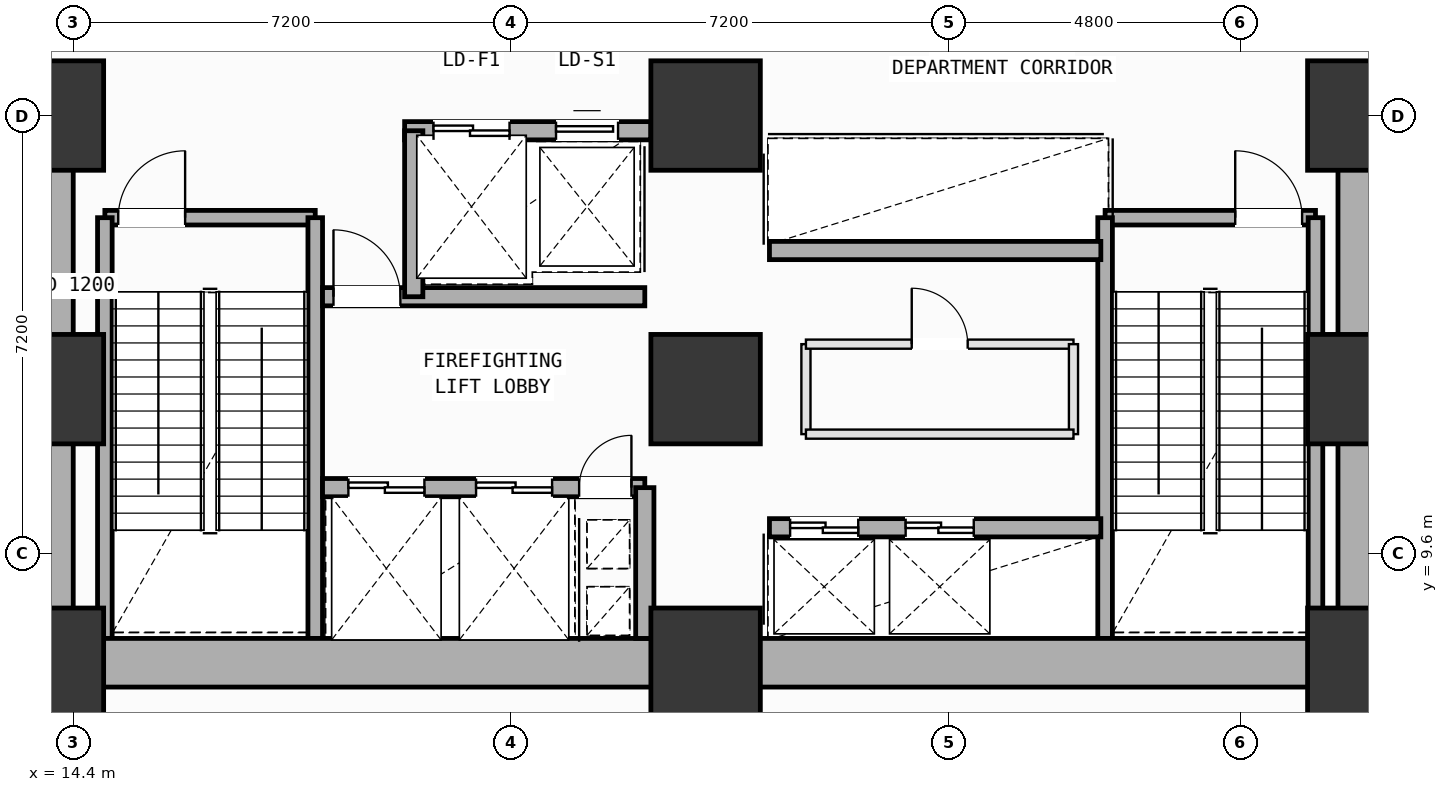
"""IFC4 building model, lengths in metres.
Left out: names, types, materials, properties, quantities, classifications, styles, units other than length and angle.
Written with IfcOpenShell. Run it as: python <this file> out.ifc"""

import sys

from ifc_helpers import new_model, si_unit, direction, frame, frame_2d, origin, origin_2d, place, context, subcontext, project, spatial, rectangle, extrude, element, fill, save


model = new_model("IFC4")
c1 = context("Model", 3, precision=1e-05, world=origin(), true_north=direction((0.0, 1.0)))
c2 = subcontext(c1, "Body", "Model", "MODEL_VIEW")
j1 = project(units=[si_unit("LENGTHUNIT", "METRE"), si_unit("PLANEANGLEUNIT", "RADIAN")], contexts=[c1])
p1 = place(None, origin())
s1 = spatial("IfcSite", under=j1, at=p1, CompositionType="ELEMENT")
p2 = place(p1, origin())
s2 = spatial("IfcBuilding", under=s1, at=p2, CompositionType="ELEMENT")
p3 = place(p2, frame((0.0, 0.0, 5.4)))
s3 = spatial("IfcBuildingStorey", under=s2, at=p3, CompositionType="ELEMENT", Elevation=5.4)
for number, where, z_axis, x_axis in (
    (1, (14.0, 7.8, 0.0), (0.0, 0.0, 1.0), (1.0, 0.0, 0.0)),
    (2, (14.0, 12.3, 0.0), (0.0, 0.0, 1.0), (1.0, 0.0, 0.0)),
    (3, (14.0, 16.8, 0.0), (0.0, 0.0, 1.0), (1.0, 0.0, 0.0)),
    (4, (24.8, 7.8, 0.0), (0.0, 0.0, 1.0), (1.0, 0.0, 0.0)),
    (5, (24.8, 12.3, 0.0), (0.0, 0.0, 1.0), (1.0, 0.0, 0.0)),
    (6, (24.8, 16.8, 0.0), (0.0, 0.0, 1.0), (1.0, 0.0, 0.0)),
    (7, (35.6, 7.8, 0.0), (0.0, 0.0, 1.0), (1.0, 0.0, 0.0)),
    (8, (35.6, 12.3, 0.0), (0.0, 0.0, 1.0), (1.0, 0.0, 0.0)),
    (9, (35.6, 16.8, 0.0), (0.0, 0.0, 1.0), (1.0, 0.0, 0.0)),
):
    element("IfcColumn", number, at=place(p3, frame(where, z_axis=z_axis, x_axis=x_axis)), inside=s3, PredefinedType="COLUMN", context=c2, shape_type="SweptSolid", body=[
        extrude(rectangle(XDim=1.8, YDim=1.8, at=origin_2d()), origin(), (0.0, 0.0, 1.0), 5.4),
    ])
p4 = place(p3, frame((14.92, 15.12, 0.0), z_axis=(0.0, 0.0, 1.0), x_axis=(1.0, 0.0, 0.0)))
e10 = element("IfcWall", 10, at=p4, inside=s3, PredefinedType="SOLIDWALL", context=c2, shape_type="SweptSolid", body=[
    extrude(rectangle(XDim=3.46, YDim=0.24, at=frame_2d((1.73, 0.0))), origin(), (0.0, 0.0, 1.0), 5.15),
])
p5 = place(p4, frame((0.22, 0.0, 0.0)))
e11 = element("IfcOpeningElement", 11, at=p5, cuts=e10, PredefinedType="OPENING", context=c2, shape_type="SweptSolid", body=[
    extrude(rectangle(XDim=1.1, YDim=2.15, at=frame_2d((0.55, 1.075))), frame((0.0, 0.13, 0.0), z_axis=(0.0, -1.0, 0.0), x_axis=(1.0, 0.0, 0.0)), (0.0, 0.0, 1.0), 0.26),
])
for number, where, z_axis, x_axis in (
    (12, (18.38, 15.12, 0.0), (0.0, 0.0, 1.0), (0.0, -1.0, 0.0)),
    (13, (14.92, 8.2, 0.0), (0.0, 0.0, 1.0), (0.0, 1.0, 0.0)),
):
    element("IfcWall", number, at=place(p3, frame(where, z_axis=z_axis, x_axis=x_axis)), inside=s3, PredefinedType="SOLIDWALL", context=c2, shape_type="SweptSolid", body=[
        extrude(rectangle(XDim=6.92, YDim=0.24, at=frame_2d((3.46, 0.0))), origin(), (0.0, 0.0, 1.0), 5.15),
    ])
p6 = place(p3, frame((31.37, 15.12, 0.0), z_axis=(0.0, 0.0, 1.0), x_axis=(1.0, 0.0, 0.0)))
e14 = element("IfcWall", 14, at=p6, inside=s3, PredefinedType="SOLIDWALL", context=c2, shape_type="SweptSolid", body=[
    extrude(rectangle(XDim=3.46, YDim=0.24, at=frame_2d((1.73, 0.0))), origin(), (0.0, 0.0, 1.0), 5.15),
])
p7 = place(p6, frame((2.14, 0.0, 0.0)))
e15 = element("IfcOpeningElement", 15, at=p7, cuts=e14, PredefinedType="OPENING", context=c2, shape_type="SweptSolid", body=[
    extrude(rectangle(XDim=1.1, YDim=2.15, at=frame_2d((0.55, 1.075))), frame((0.0, 0.13, 0.0), z_axis=(0.0, -1.0, 0.0), x_axis=(1.0, 0.0, 0.0)), (0.0, 0.0, 1.0), 0.26),
])
for number, where, z_axis, x_axis in (
    (16, (34.83, 15.12, 0.0), (0.0, 0.0, 1.0), (0.0, -1.0, 0.0)),
    (17, (31.37, 8.2, 0.0), (0.0, 0.0, 1.0), (0.0, 1.0, 0.0)),
):
    element("IfcWall", number, at=place(p3, frame(where, z_axis=z_axis, x_axis=x_axis)), inside=s3, PredefinedType="SOLIDWALL", context=c2, shape_type="SweptSolid", body=[
        extrude(rectangle(XDim=6.92, YDim=0.24, at=frame_2d((3.46, 0.0))), origin(), (0.0, 0.0, 1.0), 5.15),
    ])
for number, where, z_axis, x_axis in (
    (18, (14.0, 7.8, 0.0), (0.0, 0.0, 1.0), (1.0, 0.0, 0.0)),
    (19, (24.8, 7.8, 0.0), (0.0, 0.0, 1.0), (1.0, 0.0, 0.0)),
):
    element("IfcWall", number, at=place(p3, frame(where, z_axis=z_axis, x_axis=x_axis)), inside=s3, PredefinedType="SHEAR", context=c2, shape_type="SweptSolid", body=[
        extrude(rectangle(XDim=10.8, YDim=0.8, at=frame_2d((5.4, 0.0))), origin(), (0.0, 0.0, 1.0), 5.15),
    ])
for number, where, z_axis, x_axis in (
    (20, (35.6, 7.8, 0.0), (0.0, 0.0, 1.0), (0.0, 1.0, 0.0)),
    (21, (14.0, 16.8, 0.0), (0.0, 0.0, 1.0), (0.0, -1.0, 0.0)),
):
    element("IfcWall", number, at=place(p3, frame(where, z_axis=z_axis, x_axis=x_axis)), inside=s3, PredefinedType="SHEAR", context=c2, shape_type="SweptSolid", body=[
        extrude(rectangle(XDim=9.0, YDim=0.8, at=frame_2d((4.5, 0.0))), origin(), (0.0, 0.0, 1.0), 5.15),
    ])
p8 = place(p3, frame((19.85, 16.55, 0.0), z_axis=(0.0, 0.0, 1.0), x_axis=(1.0, 0.0, 0.0)))
e22 = element("IfcWall", 22, at=p8, inside=s3, PredefinedType="SOLIDWALL", context=c2, shape_type="SweptSolid", body=[
    extrude(rectangle(XDim=4.05, YDim=0.3, at=frame_2d((2.025, 0.0))), origin(), (0.0, 0.0, 1.0), 5.15),
])
p9 = place(p8, frame((0.475, 0.0, 0.0)))
e23 = element("IfcOpeningElement", 23, at=p9, cuts=e22, PredefinedType="OPENING", context=c2, shape_type="SweptSolid", body=[
    extrude(rectangle(XDim=1.25, YDim=2.18, at=frame_2d((0.625, 1.09))), frame((0.0, 0.16, 0.0), z_axis=(0.0, -1.0, 0.0), x_axis=(1.0, 0.0, 0.0)), (0.0, 0.0, 1.0), 0.32),
])
p10 = place(p8, frame((2.49, 0.0, 0.0)))
e24 = element("IfcOpeningElement", 24, at=p10, cuts=e22, PredefinedType="OPENING", context=c2, shape_type="SweptSolid", body=[
    extrude(rectangle(XDim=1.02, YDim=2.12, at=frame_2d((0.51, 1.06))), frame((0.0, 0.16, 0.0), z_axis=(0.0, -1.0, 0.0), x_axis=(1.0, 0.0, 0.0)), (0.0, 0.0, 1.0), 0.32),
])
p11 = place(p3, frame((18.5, 10.68, 0.0), z_axis=(0.0, 0.0, 1.0), x_axis=(1.0, 0.0, 0.0)))
e25 = element("IfcWall", 25, at=p11, inside=s3, PredefinedType="SOLIDWALL", context=c2, shape_type="SweptSolid", body=[
    extrude(rectangle(XDim=5.3, YDim=0.3, at=frame_2d((2.65, 0.0))), origin(), (0.0, 0.0, 1.0), 5.15),
])
p12 = place(p11, frame((4.22, 0.0, 0.0)))
e26 = element("IfcOpeningElement", 26, at=p12, cuts=e25, PredefinedType="OPENING", context=c2, shape_type="SweptSolid", body=[
    extrude(rectangle(XDim=0.86, YDim=2.06, at=frame_2d((0.43, 1.03))), frame((0.0, 0.16, 0.0), z_axis=(0.0, -1.0, 0.0), x_axis=(1.0, 0.0, 0.0)), (0.0, 0.0, 1.0), 0.32),
])
p13 = place(p11, frame((0.425, 0.0, 0.0)))
e27 = element("IfcOpeningElement", 27, at=p13, cuts=e25, PredefinedType="OPENING", context=c2, shape_type="SweptSolid", body=[
    extrude(rectangle(XDim=1.25, YDim=2.18, at=frame_2d((0.625, 1.09))), frame((0.0, 0.16, 0.0), z_axis=(0.0, -1.0, 0.0), x_axis=(1.0, 0.0, 0.0)), (0.0, 0.0, 1.0), 0.32),
])
p14 = place(p11, frame((2.525, 0.0, 0.0)))
e28 = element("IfcOpeningElement", 28, at=p14, cuts=e25, PredefinedType="OPENING", context=c2, shape_type="SweptSolid", body=[
    extrude(rectangle(XDim=1.25, YDim=2.18, at=frame_2d((0.625, 1.09))), frame((0.0, 0.16, 0.0), z_axis=(0.0, -1.0, 0.0), x_axis=(1.0, 0.0, 0.0)), (0.0, 0.0, 1.0), 0.32),
])
p15 = place(p3, frame((18.5, 13.82, 0.0), z_axis=(0.0, 0.0, 1.0), x_axis=(1.0, 0.0, 0.0)))
e29 = element("IfcWall", 29, at=p15, inside=s3, PredefinedType="SOLIDWALL", context=c2, shape_type="SweptSolid", body=[
    extrude(rectangle(XDim=5.3, YDim=0.3, at=frame_2d((2.65, 0.0))), origin(), (0.0, 0.0, 1.0), 5.15),
])
p16 = place(p15, frame((0.18, 0.0, 0.0)))
e30 = element("IfcOpeningElement", 30, at=p16, cuts=e29, PredefinedType="OPENING", context=c2, shape_type="SweptSolid", body=[
    extrude(rectangle(XDim=1.1, YDim=2.15, at=frame_2d((0.55, 1.075))), frame((0.0, 0.16, 0.0), z_axis=(0.0, -1.0, 0.0), x_axis=(1.0, 0.0, 0.0)), (0.0, 0.0, 1.0), 0.32),
])
p17 = place(p3, frame((23.8, 8.2, 0.0), z_axis=(0.0, 0.0, 1.0), x_axis=(0.0, 1.0, 0.0)))
e31 = element("IfcWall", 31, at=p17, inside=s3, PredefinedType="SOLIDWALL", context=c2, shape_type="SweptSolid", body=[
    extrude(rectangle(XDim=2.48, YDim=0.3, at=frame_2d((1.24, 0.0))), origin(), (0.0, 0.0, 1.0), 5.15),
])
p18 = place(p3, frame((20.0, 13.82, 0.0), z_axis=(0.0, 0.0, 1.0), x_axis=(0.0, 1.0, 0.0)))
e32 = element("IfcWall", 32, at=p18, inside=s3, PredefinedType="SOLIDWALL", context=c2, shape_type="SweptSolid", body=[
    extrude(rectangle(XDim=2.73, YDim=0.3, at=frame_2d((1.365, 0.0))), origin(), (0.0, 0.0, 1.0), 5.15),
])
p19 = place(p3, frame((25.85, 10.02, 0.0), z_axis=(0.0, 0.0, 1.0), x_axis=(1.0, 0.0, 0.0)))
e33 = element("IfcWall", 33, at=p19, inside=s3, PredefinedType="SOLIDWALL", context=c2, shape_type="SweptSolid", body=[
    extrude(rectangle(XDim=5.45, YDim=0.3, at=frame_2d((2.725, 0.0))), origin(), (0.0, 0.0, 1.0), 5.15),
])
p20 = place(p19, frame((0.34, 0.0, 0.0)))
e34 = element("IfcOpeningElement", 34, at=p20, cuts=e33, PredefinedType="OPENING", context=c2, shape_type="SweptSolid", body=[
    extrude(rectangle(XDim=1.12, YDim=2.15, at=frame_2d((0.56, 1.075))), frame((0.0, 0.16, 0.0), z_axis=(0.0, -1.0, 0.0), x_axis=(1.0, 0.0, 0.0)), (0.0, 0.0, 1.0), 0.32),
])
p21 = place(p19, frame((2.24, 0.0, 0.0)))
e35 = element("IfcOpeningElement", 35, at=p21, cuts=e33, PredefinedType="OPENING", context=c2, shape_type="SweptSolid", body=[
    extrude(rectangle(XDim=1.12, YDim=2.15, at=frame_2d((0.56, 1.075))), frame((0.0, 0.16, 0.0), z_axis=(0.0, -1.0, 0.0), x_axis=(1.0, 0.0, 0.0)), (0.0, 0.0, 1.0), 0.32),
])
p22 = place(p3, frame((25.85, 14.58, 0.0), z_axis=(0.0, 0.0, 1.0), x_axis=(1.0, 0.0, 0.0)))
e36 = element("IfcWall", 36, at=p22, inside=s3, PredefinedType="SOLIDWALL", context=c2, shape_type="SweptSolid", body=[
    extrude(rectangle(XDim=5.45, YDim=0.3, at=frame_2d((2.725, 0.0))), origin(), (0.0, 0.0, 1.0), 5.15),
])
p23 = place(p3, frame((26.45, 11.56, 0.0), z_axis=(0.0, 0.0, 1.0), x_axis=(0.0, 1.0, 0.0)))
e37 = element("IfcWall", 37, at=p23, inside=s3, PredefinedType="PARTITIONING", context=c2, shape_type="SweptSolid", body=[
    extrude(rectangle(XDim=1.48, YDim=0.15, at=frame_2d((0.74, 0.0))), origin(), (0.0, 0.0, 1.0), 5.15),
])
p24 = place(p3, frame((26.45, 13.04, 0.0), z_axis=(0.0, 0.0, 1.0), x_axis=(1.0, 0.0, 0.0)))
e38 = element("IfcWall", 38, at=p24, inside=s3, PredefinedType="PARTITIONING", context=c2, shape_type="SweptSolid", body=[
    extrude(rectangle(XDim=4.4, YDim=0.15, at=frame_2d((2.2, 0.0))), origin(), (0.0, 0.0, 1.0), 5.15),
])
p25 = place(p24, frame((1.74, 0.0, 0.0)))
e39 = element("IfcOpeningElement", 39, at=p25, cuts=e38, PredefinedType="OPENING", context=c2, shape_type="SweptSolid", body=[
    extrude(rectangle(XDim=0.92, YDim=2.1, at=frame_2d((0.46, 1.05))), frame((0.0, 0.085, 0.0), z_axis=(0.0, -1.0, 0.0), x_axis=(1.0, 0.0, 0.0)), (0.0, 0.0, 1.0), 0.17),
])
p26 = place(p3, frame((30.85, 13.04, 0.0), z_axis=(0.0, 0.0, 1.0), x_axis=(0.0, -1.0, 0.0)))
e40 = element("IfcWall", 40, at=p26, inside=s3, PredefinedType="PARTITIONING", context=c2, shape_type="SweptSolid", body=[
    extrude(rectangle(XDim=1.48, YDim=0.15, at=frame_2d((0.74, 0.0))), origin(), (0.0, 0.0, 1.0), 5.15),
])
p27 = place(p3, frame((30.85, 11.56, 0.0), z_axis=(0.0, 0.0, 1.0), x_axis=(-1.0, 0.0, 0.0)))
e41 = element("IfcWall", 41, at=p27, inside=s3, PredefinedType="PARTITIONING", context=c2, shape_type="SweptSolid", body=[
    extrude(rectangle(XDim=4.4, YDim=0.15, at=frame_2d((2.2, 0.0))), origin(), (0.0, 0.0, 1.0), 5.15),
])
p28 = place(p5, origin())
e42 = element("IfcDoor", 42, at=p28, inside=s3, OperationType="SINGLE_SWING_RIGHT", PredefinedType="DOOR", context=c2, shape_type="SweptSolid", body=[
    extrude(rectangle(XDim=1.1, YDim=2.15, at=frame_2d((0.55, 1.075))), frame((0.0, 0.025, 0.0), z_axis=(0.0, -1.0, 0.0), x_axis=(1.0, 0.0, 0.0)), (0.0, 0.0, 1.0), 0.05),
])
fill(e11, e42)
p29 = place(p7, origin())
e43 = element("IfcDoor", 43, at=p29, inside=s3, OperationType="SINGLE_SWING_LEFT", PredefinedType="DOOR", context=c2, shape_type="SweptSolid", body=[
    extrude(rectangle(XDim=1.1, YDim=2.15, at=frame_2d((0.55, 1.075))), frame((0.0, 0.025, 0.0), z_axis=(0.0, -1.0, 0.0), x_axis=(1.0, 0.0, 0.0)), (0.0, 0.0, 1.0), 0.05),
])
fill(e15, e43)
p30 = place(p12, origin())
e44 = element("IfcDoor", 44, at=p30, inside=s3, OperationType="SINGLE_SWING_RIGHT", PredefinedType="DOOR", context=c2, shape_type="SweptSolid", body=[
    extrude(rectangle(XDim=0.86, YDim=2.06, at=frame_2d((0.43, 1.03))), frame((0.0, 0.025, 0.0), z_axis=(0.0, -1.0, 0.0), x_axis=(1.0, 0.0, 0.0)), (0.0, 0.0, 1.0), 0.05),
])
fill(e26, e44)
p31 = place(p16, origin())
e45 = element("IfcDoor", 45, at=p31, inside=s3, OperationType="SINGLE_SWING_LEFT", PredefinedType="DOOR", context=c2, shape_type="SweptSolid", body=[
    extrude(rectangle(XDim=1.1, YDim=2.15, at=frame_2d((0.55, 1.075))), frame((0.0, 0.025, 0.0), z_axis=(0.0, -1.0, 0.0), x_axis=(1.0, 0.0, 0.0)), (0.0, 0.0, 1.0), 0.05),
])
fill(e30, e45)
p32 = place(p13, origin())
e46 = element("IfcDoor", 46, at=p32, inside=s3, OperationType="DOUBLE_DOOR_SLIDING", PredefinedType="DOOR", context=c2, shape_type="SweptSolid", body=[
    extrude(rectangle(XDim=1.25, YDim=2.18, at=frame_2d((0.625, 1.09))), frame((0.0, 0.025, 0.0), z_axis=(0.0, -1.0, 0.0), x_axis=(1.0, 0.0, 0.0)), (0.0, 0.0, 1.0), 0.05),
])
fill(e27, e46)
p33 = place(p14, origin())
e47 = element("IfcDoor", 47, at=p33, inside=s3, OperationType="DOUBLE_DOOR_SLIDING", PredefinedType="DOOR", context=c2, shape_type="SweptSolid", body=[
    extrude(rectangle(XDim=1.25, YDim=2.18, at=frame_2d((0.625, 1.09))), frame((0.0, 0.025, 0.0), z_axis=(0.0, -1.0, 0.0), x_axis=(1.0, 0.0, 0.0)), (0.0, 0.0, 1.0), 0.05),
])
fill(e28, e47)
p34 = place(p20, origin())
e48 = element("IfcDoor", 48, at=p34, inside=s3, OperationType="DOUBLE_DOOR_SLIDING", PredefinedType="DOOR", context=c2, shape_type="SweptSolid", body=[
    extrude(rectangle(XDim=1.12, YDim=2.15, at=frame_2d((0.56, 1.075))), frame((0.0, 0.025, 0.0), z_axis=(0.0, -1.0, 0.0), x_axis=(1.0, 0.0, 0.0)), (0.0, 0.0, 1.0), 0.05),
])
fill(e34, e48)
p35 = place(p21, origin())
e49 = element("IfcDoor", 49, at=p35, inside=s3, OperationType="DOUBLE_DOOR_SLIDING", PredefinedType="DOOR", context=c2, shape_type="SweptSolid", body=[
    extrude(rectangle(XDim=1.12, YDim=2.15, at=frame_2d((0.56, 1.075))), frame((0.0, 0.025, 0.0), z_axis=(0.0, -1.0, 0.0), x_axis=(1.0, 0.0, 0.0)), (0.0, 0.0, 1.0), 0.05),
])
fill(e35, e49)
p36 = place(p9, origin())
e50 = element("IfcDoor", 50, at=p36, inside=s3, OperationType="DOUBLE_DOOR_SLIDING", PredefinedType="DOOR", context=c2, shape_type="SweptSolid", body=[
    extrude(rectangle(XDim=1.25, YDim=2.18, at=frame_2d((0.625, 1.09))), frame((0.0, 0.025, 0.0), z_axis=(0.0, -1.0, 0.0), x_axis=(1.0, 0.0, 0.0)), (0.0, 0.0, 1.0), 0.05),
])
fill(e23, e50)
p37 = place(p10, origin())
e51 = element("IfcDoor", 51, at=p37, inside=s3, OperationType="SLIDING_TO_LEFT", PredefinedType="DOOR", context=c2, shape_type="SweptSolid", body=[
    extrude(rectangle(XDim=1.02, YDim=2.12, at=frame_2d((0.51, 1.06))), frame((0.0, 0.025, 0.0), z_axis=(0.0, -1.0, 0.0), x_axis=(1.0, 0.0, 0.0)), (0.0, 0.0, 1.0), 0.05),
])
fill(e24, e51)
p38 = place(p25, origin())
e52 = element("IfcDoor", 52, at=p38, inside=s3, OperationType="SINGLE_SWING_LEFT", PredefinedType="DOOR", context=c2, shape_type="SweptSolid", body=[
    extrude(rectangle(XDim=0.92, YDim=2.1, at=frame_2d((0.46, 1.05))), frame((0.0, 0.025, 0.0), z_axis=(0.0, -1.0, 0.0), x_axis=(1.0, 0.0, 0.0)), (0.0, 0.0, 1.0), 0.05),
])
fill(e39, e52)
save(model, sys.argv[1])
